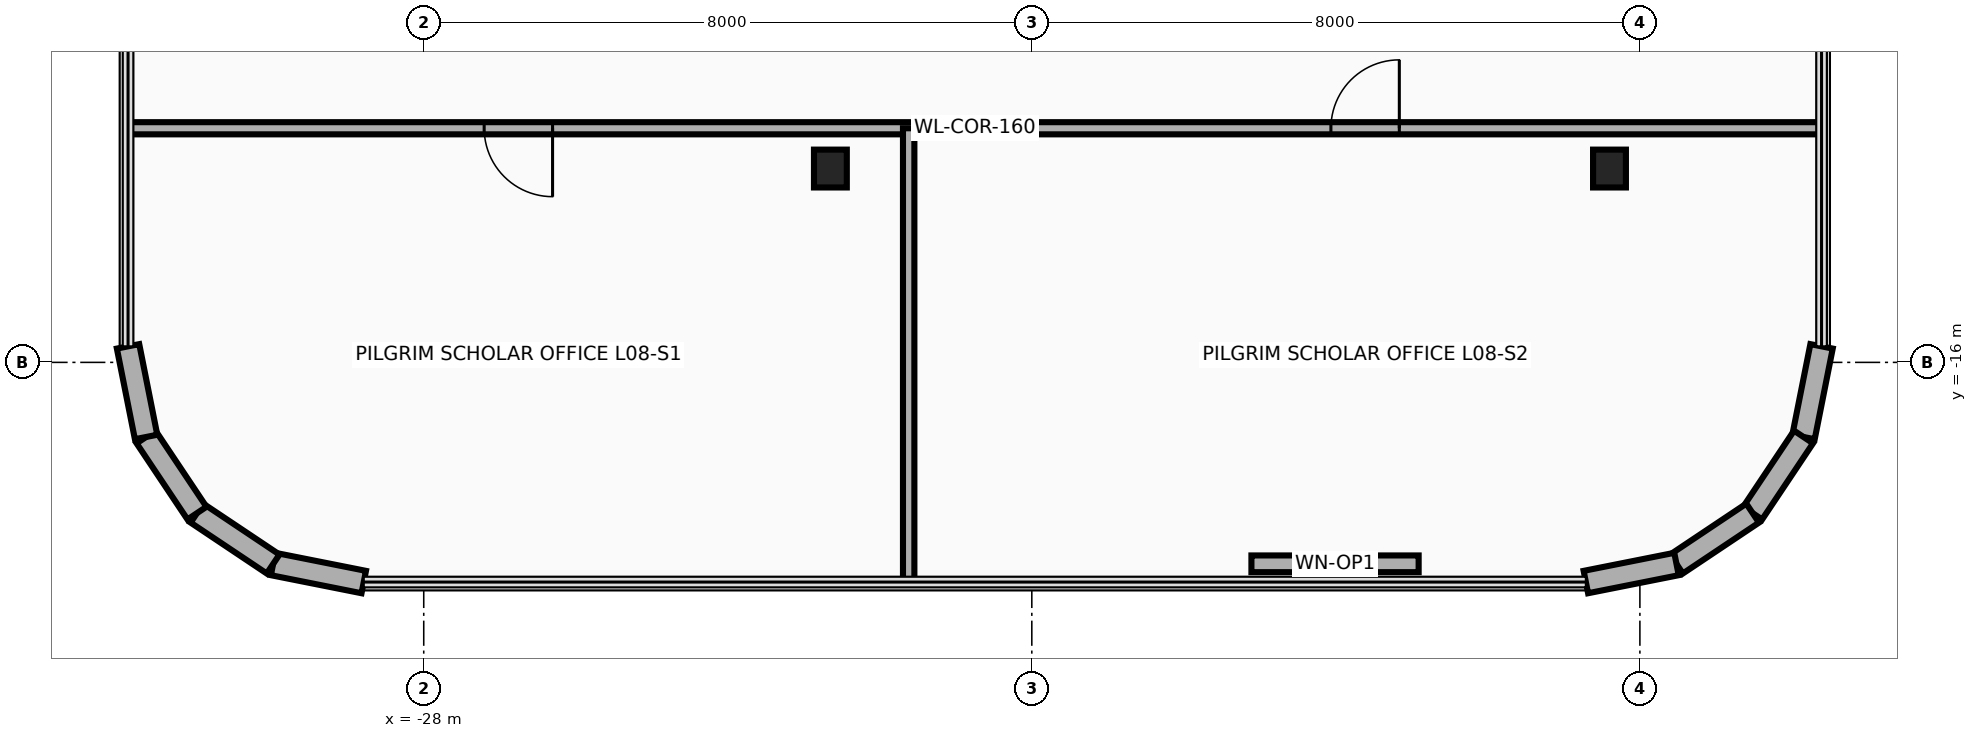
"""IFC4 building model, lengths in metres.
Left out: names, types, materials, properties, quantities, classifications, styles, units other than length and angle.
Written with IfcOpenShell. Run it as: python <this file> out.ifc"""

import sys

from ifc_helpers import new_model, si_unit, direction, frame, frame_2d, origin, origin_2d, place, context, subcontext, project, spatial, rectangle, i_section, extrude, source, transform, mapped, element, fill, save


model = new_model("IFC4")
c1 = context("Model", 3, precision=1e-05, world=origin(), true_north=direction((0.0, 1.0)))
c2 = subcontext(c1, "Body", "Model", "MODEL_VIEW")
j1 = project(units=[si_unit("LENGTHUNIT", "METRE"), si_unit("PLANEANGLEUNIT", "RADIAN")], contexts=[c1])
p1 = place(None, origin())
s1 = spatial("IfcSite", under=j1, at=p1, CompositionType="ELEMENT")
p2 = place(p1, origin())
s2 = spatial("IfcBuilding", under=s1, at=p2, CompositionType="ELEMENT")
p3 = place(p2, frame((0.0, 0.0, 37.1)))
s3 = spatial("IfcBuildingStorey", under=s2, at=p3, CompositionType="ELEMENT", Elevation=37.1)
m1 = source(origin(), c2, "Body", "SweptSolid", [
    extrude(i_section(OverallWidth=0.432, OverallDepth=0.498, WebThickness=0.056, FlangeThickness=0.089, at=origin_2d()), origin(), (0.0, 0.0, 1.0), 3.7),
])
for number, where, z_axis, x_axis in (
    (1, (-22.65, -13.45, 0.0), (0.0, 0.0, 1.0), (1.0, 0.0, 0.0)),
    (2, (-12.4, -13.45, 0.0), (0.0, 0.0, 1.0), (1.0, 0.0, 0.0)),
):
    element("IfcColumn", number, at=place(p3, frame(where, z_axis=z_axis, x_axis=x_axis)), inside=s3, PredefinedType="COLUMN", context=c2, shape_type="MappedRepresentation", body=[
        mapped(m1, transform((0.0, 0.0, 0.0), x_axis=(1.0, 0.0, 0.0), y_axis=(0.0, 1.0, 0.0), z_axis=(0.0, 0.0, 1.0), scale=1.0)),
    ])
p4 = place(p3, frame((-9.61, -15.789, 0.0), z_axis=(0.0, 0.0, 1.0), x_axis=(-0.194996050505, -0.980804027463, 0.0)))
e3 = element("IfcWall", 3, at=p4, inside=s3, PredefinedType="SOLIDWALL", context=c2, shape_type="SweptSolid", body=[
    extrude(rectangle(XDim=1.216, YDim=0.3, at=frame_2d((0.608, 0.0))), origin(), (0.0, 0.0, 1.0), 3.46),
])
for number, where, z_axis, x_axis in (
    (4, (-9.847, -16.982, 0.0), (0.0, 0.0, 1.0), (-0.556, -0.831, 0.0)),
    (5, (-10.517, -17.983, 0.0), (0.0, 0.0, 1.0), (-0.831, -0.556, 0.0)),
):
    element("IfcWall", number, at=place(p3, frame(where, z_axis=z_axis, x_axis=x_axis)), inside=s3, PredefinedType="SOLIDWALL", context=c2, shape_type="SweptSolid", body=[
        extrude(rectangle(XDim=1.205, YDim=0.3, at=frame_2d((0.603, 0.0))), origin(), (0.0, 0.0, 1.0), 3.46),
    ])
p5 = place(p3, frame((-11.518, -18.653, 0.0), z_axis=(0.0, 0.0, 1.0), x_axis=(-0.980804027463, -0.194996050505, 0.0)))
e6 = element("IfcWall", 6, at=p5, inside=s3, PredefinedType="SOLIDWALL", context=c2, shape_type="SweptSolid", body=[
    extrude(rectangle(XDim=1.216, YDim=0.3, at=frame_2d((0.608, 0.0))), origin(), (0.0, 0.0, 1.0), 3.46),
])
p6 = place(p3, frame((-14.911, -18.65, 0.0), z_axis=(0.0, 0.0, 1.0), x_axis=(-1.0, 0.0, 0.0)))
e7 = element("IfcWall", 7, at=p6, inside=s3, PredefinedType="SOLIDWALL", context=c2, shape_type="SweptSolid", body=[
    extrude(rectangle(XDim=2.2, YDim=0.22, at=frame_2d((1.1, 0.0))), origin(), (0.0, 0.0, 1.0), 3.46),
])
p7 = place(p6, frame((0.65, 0.0, 0.95)))
e8 = element("IfcOpeningElement", 8, at=p7, cuts=e7, PredefinedType="OPENING", context=c2, shape_type="SweptSolid", body=[
    extrude(rectangle(XDim=0.9, YDim=1.3, at=frame_2d((0.45, 0.65))), frame((0.0, 0.125, 0.0), z_axis=(0.0, -1.0, 0.0), x_axis=(1.0, 0.0, 0.0)), (0.0, 0.0, 1.0), 0.25),
])
p8 = place(p3, frame((-28.789, -18.89, 0.0), z_axis=(0.0, 0.0, 1.0), x_axis=(-0.980804027463, 0.194996050505, 0.0)))
e9 = element("IfcWall", 9, at=p8, inside=s3, PredefinedType="SOLIDWALL", context=c2, shape_type="SweptSolid", body=[
    extrude(rectangle(XDim=1.216, YDim=0.3, at=frame_2d((0.608, 0.0))), origin(), (0.0, 0.0, 1.0), 3.46),
])
for number, where, z_axis, x_axis in (
    (10, (-29.982, -18.653, 0.0), (0.0, 0.0, 1.0), (-0.831, 0.556, 0.0)),
    (11, (-30.983, -17.983, 0.0), (0.0, 0.0, 1.0), (-0.556, 0.831, 0.0)),
):
    element("IfcWall", number, at=place(p3, frame(where, z_axis=z_axis, x_axis=x_axis)), inside=s3, PredefinedType="SOLIDWALL", context=c2, shape_type="SweptSolid", body=[
        extrude(rectangle(XDim=1.205, YDim=0.3, at=frame_2d((0.603, 0.0))), origin(), (0.0, 0.0, 1.0), 3.46),
    ])
p9 = place(p3, frame((-31.653, -16.982, 0.0), z_axis=(0.0, 0.0, 1.0), x_axis=(-0.194996050505, 0.980804027463, 0.0)))
e12 = element("IfcWall", 12, at=p9, inside=s3, PredefinedType="SOLIDWALL", context=c2, shape_type="SweptSolid", body=[
    extrude(rectangle(XDim=1.216, YDim=0.3, at=frame_2d((0.608, 0.0))), origin(), (0.0, 0.0, 1.0), 3.46),
])
p10 = place(p3, frame((-31.89, -12.92, 0.0), z_axis=(0.0, 0.0, 1.0), x_axis=(1.0, 0.0, 0.0)))
e13 = element("IfcWall", 13, at=p10, inside=s3, PredefinedType="PARTITIONING", context=c2, shape_type="SweptSolid", body=[
    extrude(rectangle(XDim=22.28, YDim=0.16, at=frame_2d((11.14, 0.0))), origin(), (0.0, 0.0, 1.0), 2.834),
])
p11 = place(p10, frame((4.685, 0.0, 0.0)))
e14 = element("IfcOpeningElement", 14, at=p11, cuts=e13, PredefinedType="OPENING", context=c2, shape_type="SweptSolid", body=[
    extrude(rectangle(XDim=0.9, YDim=2.1, at=frame_2d((0.45, 1.05))), frame((0.0, 0.095, 0.0), z_axis=(0.0, -1.0, 0.0), x_axis=(1.0, 0.0, 0.0)), (0.0, 0.0, 1.0), 0.19),
])
p12 = place(p10, frame((15.825, 0.0, 0.0)))
e15 = element("IfcOpeningElement", 15, at=p12, cuts=e13, PredefinedType="OPENING", context=c2, shape_type="SweptSolid", body=[
    extrude(rectangle(XDim=0.9, YDim=2.1, at=frame_2d((0.45, 1.05))), frame((0.0, 0.095, 0.0), z_axis=(0.0, -1.0, 0.0), x_axis=(1.0, 0.0, 0.0)), (0.0, 0.0, 1.0), 0.19),
])
p13 = place(p3, frame((-21.62, -18.89, 0.0), z_axis=(0.0, 0.0, 1.0), x_axis=(0.0, 1.0, 0.0)))
e16 = element("IfcWall", 16, at=p13, inside=s3, PredefinedType="PARTITIONING", context=c2, shape_type="SweptSolid", body=[
    extrude(rectangle(XDim=5.97, YDim=0.15, at=frame_2d((2.985, 0.0))), origin(), (0.0, 0.0, 1.0), 2.896),
])
p14 = place(p7, origin())
e17 = element("IfcWindow", 17, at=p14, inside=s3, PartitioningType="SINGLE_PANEL", PredefinedType="WINDOW", context=c2, shape_type="SweptSolid", body=[
    extrude(rectangle(XDim=0.9, YDim=1.3, at=frame_2d((0.45, 0.65))), frame((0.0, 0.03, 0.0), z_axis=(0.0, -1.0, 0.0), x_axis=(1.0, 0.0, 0.0)), (0.0, 0.0, 1.0), 0.06),
])
fill(e8, e17)
p15 = place(p11, frame((0.9, 0.0, 0.0), z_axis=(0.0, 0.0, 1.0), x_axis=(-1.0, 0.0, 0.0)))
e18 = element("IfcDoor", 18, at=p15, inside=s3, OperationType="SINGLE_SWING_LEFT", PredefinedType="DOOR", context=c2, shape_type="SweptSolid", body=[
    extrude(rectangle(XDim=0.9, YDim=2.1, at=frame_2d((0.45, 1.05))), frame((0.0, 0.025, 0.0), z_axis=(0.0, -1.0, 0.0), x_axis=(1.0, 0.0, 0.0)), (0.0, 0.0, 1.0), 0.05),
])
fill(e14, e18)
p16 = place(p12, origin())
e19 = element("IfcDoor", 19, at=p16, inside=s3, OperationType="SINGLE_SWING_RIGHT", PredefinedType="DOOR", context=c2, shape_type="SweptSolid", body=[
    extrude(rectangle(XDim=0.9, YDim=2.1, at=frame_2d((0.45, 1.05))), frame((0.0, 0.025, 0.0), z_axis=(0.0, -1.0, 0.0), x_axis=(1.0, 0.0, 0.0)), (0.0, 0.0, 1.0), 0.05),
])
fill(e15, e19)
save(model, sys.argv[1])
